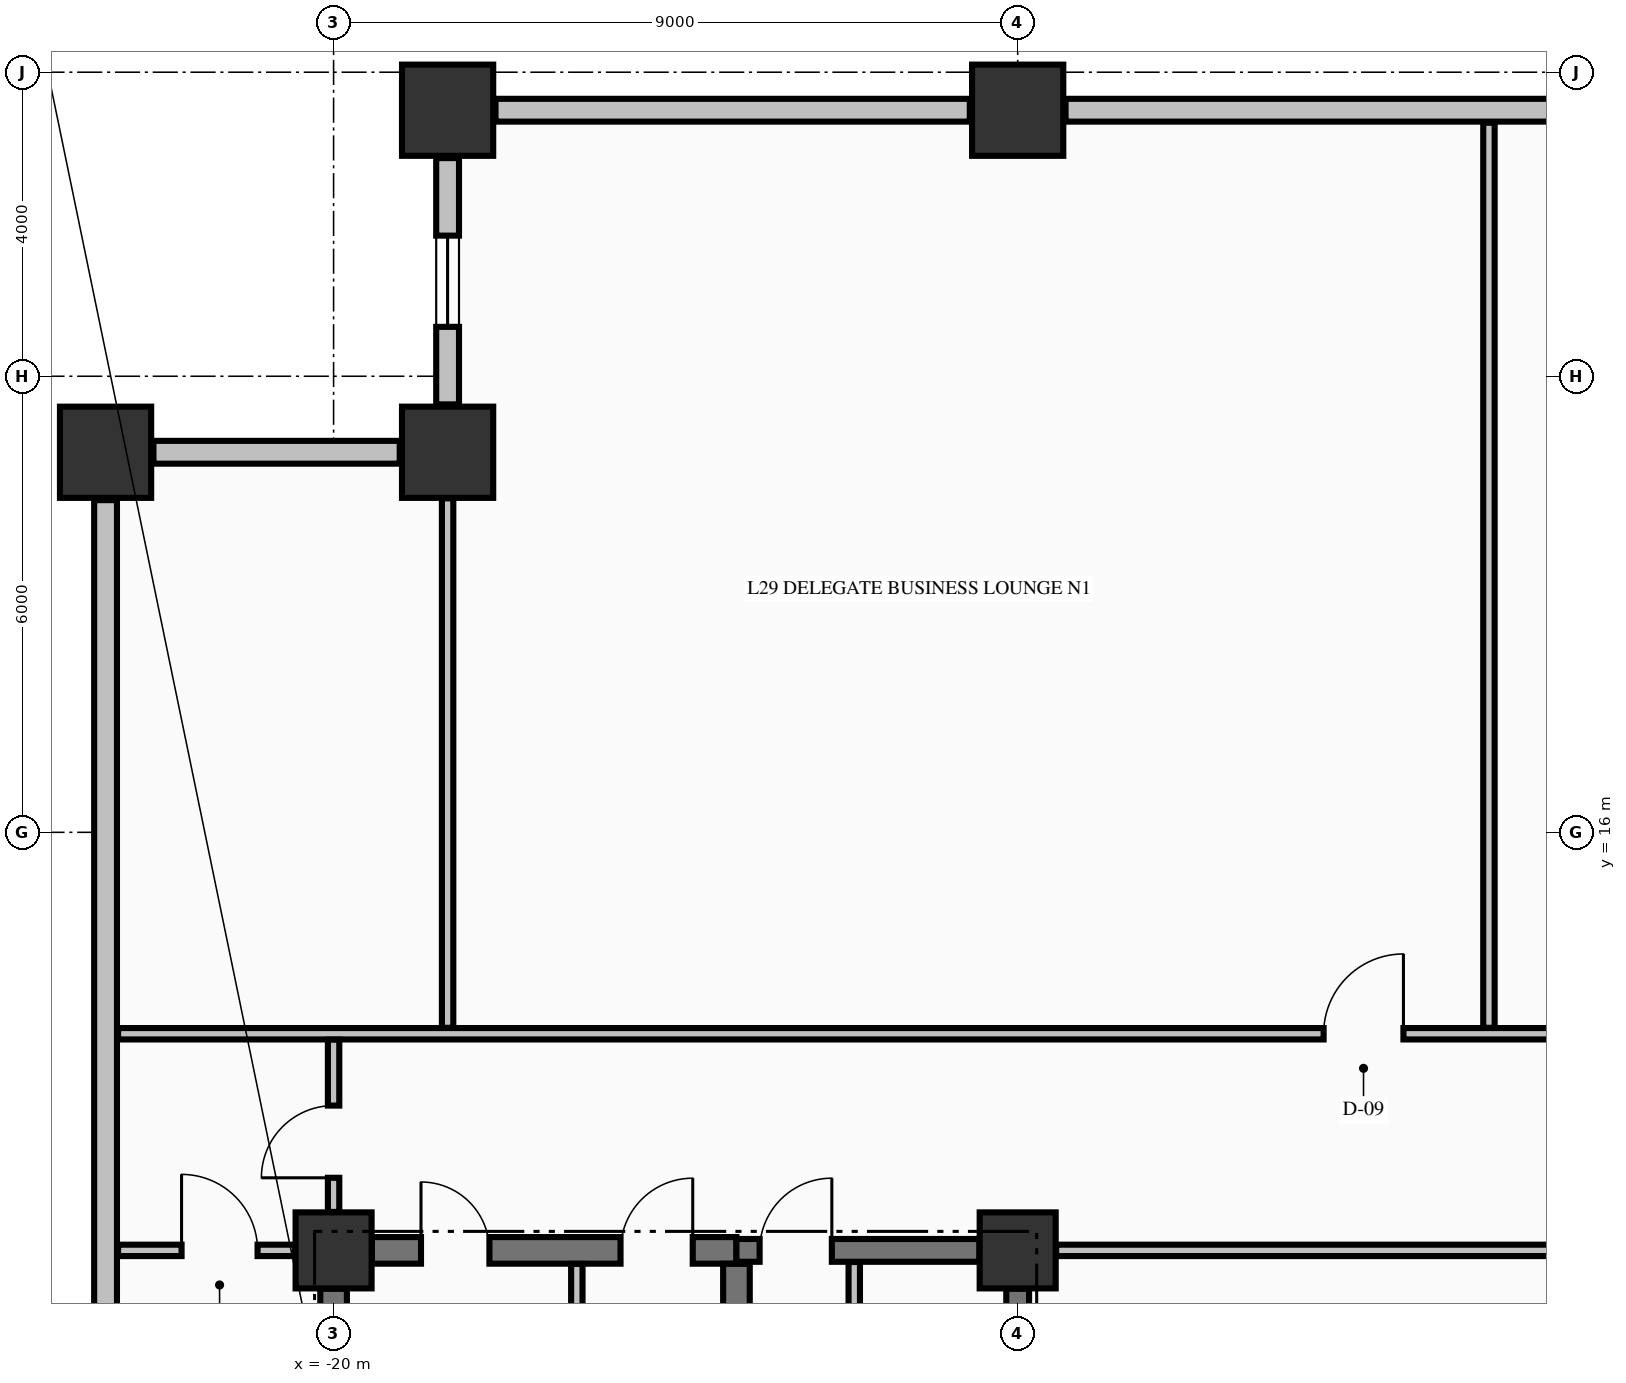
"""IFC4 building model, lengths in metres.
Left out: names, types, materials, properties, quantities, classifications, styles, units other than length and angle.
Written with IfcOpenShell. Run it as: python <this file> out.ifc"""

import sys

from ifc_helpers import new_model, si_unit, direction, frame, frame_2d, origin, origin_2d, place, context, subcontext, project, spatial, rectangle, extrude, element, fill, save


model = new_model("IFC4")
c1 = context("Model", 3, precision=1e-05, world=origin(), true_north=direction((0.0, 1.0)))
c2 = subcontext(c1, "Body", "Model", "MODEL_VIEW")
j1 = project(units=[si_unit("LENGTHUNIT", "METRE"), si_unit("PLANEANGLEUNIT", "RADIAN")], contexts=[c1])
p1 = place(None, origin())
s1 = spatial("IfcSite", under=j1, at=p1, CompositionType="ELEMENT")
p2 = place(p1, origin())
s2 = spatial("IfcBuilding", under=s1, at=p2, CompositionType="ELEMENT")
p3 = place(p2, frame((0.0, 0.0, 116.35)))
s3 = spatial("IfcBuildingStorey", under=s2, at=p3, CompositionType="ELEMENT", Elevation=116.35)
for number, where, z_axis, x_axis in (
    (1, (-18.5, 25.5, -0.425), (0.0, 0.0, 1.0), (1.0, 0.0, 0.0)),
    (2, (-11.0, 25.5, -0.425), (0.0, 0.0, 1.0), (1.0, 0.0, 0.0)),
    (3, (-23.0, 21.0, -0.425), (0.0, 0.0, 1.0), (1.0, 0.0, 0.0)),
    (4, (-18.5, 21.0, -0.425), (0.0, 0.0, 1.0), (1.0, 0.0, 0.0)),
):
    element("IfcColumn", number, at=place(p3, frame(where, z_axis=z_axis, x_axis=x_axis)), inside=s3, PredefinedType="COLUMN", context=c2, shape_type="SweptSolid", body=[
        extrude(rectangle(XDim=1.2, YDim=1.2, at=origin_2d()), origin(), (0.0, 0.0, 1.0), 5.0),
    ])
for number, where, z_axis, x_axis in (
    (5, (-20.0, 10.5, -0.425), (0.0, 0.0, 1.0), (1.0, 0.0, 0.0)),
    (6, (-11.0, 10.5, -0.425), (0.0, 0.0, 1.0), (1.0, 0.0, 0.0)),
):
    element("IfcColumn", number, at=place(p3, frame(where, z_axis=z_axis, x_axis=x_axis)), inside=s3, PredefinedType="COLUMN", context=c2, shape_type="SweptSolid", body=[
        extrude(rectangle(XDim=1.0, YDim=1.0, at=origin_2d()), origin(), (0.0, 0.0, 1.0), 5.0),
    ])
p4 = place(p3, frame((-18.5, 24.87, 0.0), z_axis=(0.0, 0.0, 1.0), x_axis=(0.0, -1.0, 0.0)))
e7 = element("IfcWall", 7, at=p4, inside=s3, PredefinedType="STANDARD", context=c2, shape_type="SweptSolid", body=[
    extrude(rectangle(XDim=3.24, YDim=0.3, at=frame_2d((1.62, 0.0))), origin(), (0.0, 0.0, 1.0), 2.767),
])
p5 = place(p4, frame((1.02, 0.0, 0.82)))
e8 = element("IfcOpeningElement", 8, at=p5, cuts=e7, PredefinedType="OPENING", context=c2, shape_type="SweptSolid", body=[
    extrude(rectangle(XDim=1.2, YDim=1.65, at=frame_2d((0.6, 0.825))), frame((0.0, 0.16, 0.0), z_axis=(0.0, -1.0, 0.0), x_axis=(1.0, 0.0, 0.0)), (0.0, 0.0, 1.0), 0.32),
])
p6 = place(p3, frame((-19.13, 21.0, 0.0), z_axis=(0.0, 0.0, 1.0), x_axis=(-1.0, 0.0, 0.0)))
e9 = element("IfcWall", 9, at=p6, inside=s3, PredefinedType="STANDARD", context=c2, shape_type="SweptSolid", body=[
    extrude(rectangle(XDim=3.24, YDim=0.3, at=frame_2d((1.62, 0.0))), origin(), (0.0, 0.0, 1.0), 2.167),
])
p7 = place(p3, frame((-11.63, 25.5, 0.0), z_axis=(0.0, 0.0, 1.0), x_axis=(-1.0, 0.0, 0.0)))
e10 = element("IfcWall", 10, at=p7, inside=s3, PredefinedType="STANDARD", context=c2, shape_type="SweptSolid", body=[
    extrude(rectangle(XDim=6.24, YDim=0.3, at=frame_2d((3.12, 0.0))), origin(), (0.0, 0.0, 1.0), 2.167),
])
p8 = place(p3, frame((-0.63, 25.5, 0.0), z_axis=(0.0, 0.0, 1.0), x_axis=(-1.0, 0.0, 0.0)))
e11 = element("IfcWall", 11, at=p8, inside=s3, PredefinedType="STANDARD", context=c2, shape_type="SweptSolid", body=[
    extrude(rectangle(XDim=9.74, YDim=0.3, at=frame_2d((4.87, 0.0))), origin(), (0.0, 0.0, 1.0), 2.167),
])
p9 = place(p3, frame((-23.0, 20.37, 0.0), z_axis=(0.0, 0.0, 1.0), x_axis=(0.0, -1.0, 0.0)))
e12 = element("IfcWall", 12, at=p9, inside=s3, PredefinedType="STANDARD", context=c2, shape_type="SweptSolid", body=[
    extrude(rectangle(XDim=10.74, YDim=0.3, at=frame_2d((5.37, 0.0))), origin(), (0.0, 0.0, 1.0), 2.167),
])
p10 = place(p3, frame((-19.496, 10.5, 0.0), z_axis=(0.0, 0.0, 1.0), x_axis=(1.0, 0.0, 0.0)))
e13 = element("IfcWall", 13, at=p10, inside=s3, PredefinedType="SHEAR", context=c2, shape_type="SweptSolid", body=[
    extrude(rectangle(XDim=4.796, YDim=0.35, at=frame_2d((2.398, 0.0))), origin(), (0.0, 0.0, 1.0), 4.575),
])
p11 = place(p10, frame((0.646, 0.0, 0.0)))
e14 = element("IfcOpeningElement", 14, at=p11, cuts=e13, PredefinedType="OPENING", context=c2, shape_type="SweptSolid", body=[
    extrude(rectangle(XDim=0.9, YDim=2.15, at=frame_2d((0.45, 1.075))), frame((0.0, 0.185, 0.0), z_axis=(0.0, -1.0, 0.0), x_axis=(1.0, 0.0, 0.0)), (0.0, 0.0, 1.0), 0.37),
])
p12 = place(p10, frame((3.271, 0.0, 0.0)))
e15 = element("IfcOpeningElement", 15, at=p12, cuts=e13, PredefinedType="OPENING", context=c2, shape_type="SweptSolid", body=[
    extrude(rectangle(XDim=0.95, YDim=2.15, at=frame_2d((0.475, 1.075))), frame((0.0, 0.185, 0.0), z_axis=(0.0, -1.0, 0.0), x_axis=(1.0, 0.0, 0.0)), (0.0, 0.0, 1.0), 0.37),
])
p13 = place(p3, frame((-14.7, 10.5, 0.0), z_axis=(0.0, 0.0, 1.0), x_axis=(1.0, 0.0, 0.0)))
e16 = element("IfcWall", 16, at=p13, inside=s3, PredefinedType="SHEAR", context=c2, shape_type="SweptSolid", body=[
    extrude(rectangle(XDim=3.196, YDim=0.3, at=frame_2d((1.598, 0.0))), origin(), (0.0, 0.0, 1.0), 4.575),
])
p14 = place(p13, frame((0.305, 0.0, 0.0)))
e17 = element("IfcOpeningElement", 17, at=p14, cuts=e16, PredefinedType="OPENING", context=c2, shape_type="SweptSolid", body=[
    extrude(rectangle(XDim=0.95, YDim=2.15, at=frame_2d((0.475, 1.075))), frame((0.0, 0.16, 0.0), z_axis=(0.0, -1.0, 0.0), x_axis=(1.0, 0.0, 0.0)), (0.0, 0.0, 1.0), 0.32),
])
p15 = place(p3, frame((-22.835, 10.5, 0.0), z_axis=(0.0, 0.0, 1.0), x_axis=(1.0, 0.0, 0.0)))
e18 = element("IfcWall", 18, at=p15, inside=s3, PredefinedType="PARTITIONING", context=c2, shape_type="SweptSolid", body=[
    extrude(rectangle(XDim=2.329, YDim=0.15, at=frame_2d((1.165, 0.0))), origin(), (0.0, 0.0, 1.0), 4.575),
])
p16 = place(p15, frame((0.835, 0.0, 0.0)))
e19 = element("IfcOpeningElement", 19, at=p16, cuts=e18, PredefinedType="OPENING", context=c2, shape_type="SweptSolid", body=[
    extrude(rectangle(XDim=1.0, YDim=2.15, at=frame_2d((0.5, 1.075))), frame((0.0, 0.085, 0.0), z_axis=(0.0, -1.0, 0.0), x_axis=(1.0, 0.0, 0.0)), (0.0, 0.0, 1.0), 0.17),
])
p17 = place(p3, frame((-10.494, 10.5, 0.0), z_axis=(0.0, 0.0, 1.0), x_axis=(1.0, 0.0, 0.0)))
e20 = element("IfcWall", 20, at=p17, inside=s3, PredefinedType="PARTITIONING", context=c2, shape_type="SweptSolid", body=[
    extrude(rectangle(XDim=20.988, YDim=0.15, at=frame_2d((10.494, 0.0))), origin(), (0.0, 0.0, 1.0), 4.575),
])
p18 = place(p17, frame((15.394, 0.0, 0.0)))
e21 = element("IfcOpeningElement", 21, at=p18, cuts=e20, PredefinedType="OPENING", context=c2, shape_type="SweptSolid", body=[
    extrude(rectangle(XDim=1.1, YDim=2.15, at=frame_2d((0.55, 1.075))), frame((0.0, 0.085, 0.0), z_axis=(0.0, -1.0, 0.0), x_axis=(1.0, 0.0, 0.0)), (0.0, 0.0, 1.0), 0.17),
])
p19 = place(p3, frame((-22.835, 13.35, 0.0), z_axis=(0.0, 0.0, 1.0), x_axis=(1.0, 0.0, 0.0)))
e22 = element("IfcWall", 22, at=p19, inside=s3, PredefinedType="PARTITIONING", context=c2, shape_type="SweptSolid", body=[
    extrude(rectangle(XDim=50.67, YDim=0.15, at=frame_2d((25.335, 0.0))), origin(), (0.0, 0.0, 1.0), 4.575),
])
p20 = place(p19, frame((15.86, 0.0, 0.0)))
e23 = element("IfcOpeningElement", 23, at=p20, cuts=e22, PredefinedType="OPENING", context=c2, shape_type="SweptSolid", body=[
    extrude(rectangle(XDim=1.05, YDim=2.15, at=frame_2d((0.525, 1.075))), frame((0.0, 0.085, 0.0), z_axis=(0.0, -1.0, 0.0), x_axis=(1.0, 0.0, 0.0)), (0.0, 0.0, 1.0), 0.17),
])
p21 = place(p19, frame((29.81, 0.0, 0.0)))
e24 = element("IfcOpeningElement", 24, at=p21, cuts=e22, PredefinedType="OPENING", context=c2, shape_type="SweptSolid", body=[
    extrude(rectangle(XDim=1.05, YDim=2.15, at=frame_2d((0.525, 1.075))), frame((0.0, 0.085, 0.0), z_axis=(0.0, -1.0, 0.0), x_axis=(1.0, 0.0, 0.0)), (0.0, 0.0, 1.0), 0.17),
])
p22 = place(p3, frame((-20.0, 0.504, 0.0), z_axis=(0.0, 0.0, 1.0), x_axis=(0.0, 1.0, 0.0)))
e25 = element("IfcWall", 25, at=p22, inside=s3, PredefinedType="SHEAR", context=c2, shape_type="SweptSolid", body=[
    extrude(rectangle(XDim=9.492, YDim=0.35, at=frame_2d((4.746, 0.0))), origin(), (0.0, 0.0, 1.0), 4.575),
])
p23 = place(p3, frame((-14.7, 5.852, 0.0), z_axis=(0.0, 0.0, 1.0), x_axis=(0.0, 1.0, 0.0)))
e26 = element("IfcWall", 26, at=p23, inside=s3, PredefinedType="SHEAR", context=c2, shape_type="SweptSolid", body=[
    extrude(rectangle(XDim=4.471, YDim=0.35, at=frame_2d((2.235, 0.0))), origin(), (0.0, 0.0, 1.0), 4.575),
])
p24 = place(p3, frame((-11.0, 5.852, 0.0), z_axis=(0.0, 0.0, 1.0), x_axis=(0.0, 1.0, 0.0)))
e27 = element("IfcWall", 27, at=p24, inside=s3, PredefinedType="SHEAR", context=c2, shape_type="SweptSolid", body=[
    extrude(rectangle(XDim=4.144, YDim=0.3, at=frame_2d((2.072, 0.0))), origin(), (0.0, 0.0, 1.0), 4.575),
])
p25 = place(p3, frame((-20.0, 11.006, 0.0), z_axis=(0.0, 0.0, 1.0), x_axis=(0.0, 1.0, 0.0)))
e28 = element("IfcWall", 28, at=p25, inside=s3, PredefinedType="PARTITIONING", context=c2, shape_type="SweptSolid", body=[
    extrude(rectangle(XDim=2.266, YDim=0.15, at=frame_2d((1.133, 0.0))), origin(), (0.0, 0.0, 1.0), 4.065),
])
p26 = place(p25, frame((0.449, 0.0, 0.0)))
e29 = element("IfcOpeningElement", 29, at=p26, cuts=e28, PredefinedType="OPENING", context=c2, shape_type="SweptSolid", body=[
    extrude(rectangle(XDim=0.95, YDim=2.02, at=frame_2d((0.475, 1.01))), frame((0.0, 0.085, 0.0), z_axis=(0.0, -1.0, 0.0), x_axis=(1.0, 0.0, 0.0)), (0.0, 0.0, 1.0), 0.17),
])
p27 = place(p3, frame((-18.5, 13.428, 0.0), z_axis=(0.0, 0.0, 1.0), x_axis=(0.0, 1.0, 0.0)))
e30 = element("IfcWall", 30, at=p27, inside=s3, PredefinedType="PARTITIONING", context=c2, shape_type="SweptSolid", body=[
    extrude(rectangle(XDim=6.966, YDim=0.15, at=frame_2d((3.483, 0.0))), origin(), (0.0, 0.0, 1.0), 4.575),
])
p28 = place(p3, frame((-16.8, 4.878, 0.0), z_axis=(0.0, 0.0, 1.0), x_axis=(0.0, 1.0, 0.0)))
e31 = element("IfcWall", 31, at=p28, inside=s3, PredefinedType="PARTITIONING", context=c2, shape_type="SweptSolid", body=[
    extrude(rectangle(XDim=5.444, YDim=0.15, at=frame_2d((2.722, 0.0))), origin(), (0.0, 0.0, 1.0), 4.575),
])
p29 = place(p3, frame((-13.15, 7.228, 0.0), z_axis=(0.0, 0.0, 1.0), x_axis=(0.0, 1.0, 0.0)))
e32 = element("IfcWall", 32, at=p29, inside=s3, PredefinedType="PARTITIONING", context=c2, shape_type="SweptSolid", body=[
    extrude(rectangle(XDim=3.119, YDim=0.15, at=frame_2d((1.56, 0.0))), origin(), (0.0, 0.0, 1.0), 4.575),
])
p30 = place(p29, frame((1.097, 0.0, 0.0)))
e33 = element("IfcOpeningElement", 33, at=p30, cuts=e32, PredefinedType="OPENING", context=c2, shape_type="SweptSolid", body=[
    extrude(rectangle(XDim=0.95, YDim=2.15, at=frame_2d((0.475, 1.075))), frame((0.0, 0.085, 0.0), z_axis=(0.0, -1.0, 0.0), x_axis=(1.0, 0.0, 0.0)), (0.0, 0.0, 1.0), 0.17),
])
p31 = place(p3, frame((-4.8, 13.428, 0.0), z_axis=(0.0, 0.0, 1.0), x_axis=(0.0, 1.0, 0.0)))
e34 = element("IfcWall", 34, at=p31, inside=s3, PredefinedType="PARTITIONING", context=c2, shape_type="SweptSolid", body=[
    extrude(rectangle(XDim=11.907, YDim=0.15, at=frame_2d((5.954, 0.0))), origin(), (0.0, 0.0, 1.0), 4.575),
])
p32 = place(p5, origin())
e35 = element("IfcWindow", 35, at=p32, inside=s3, PartitioningType="SINGLE_PANEL", PredefinedType="WINDOW", context=c2, shape_type="SweptSolid", body=[
    extrude(rectangle(XDim=1.2, YDim=1.65, at=frame_2d((0.6, 0.825))), frame((0.0, 0.03, 0.0), z_axis=(0.0, -1.0, 0.0), x_axis=(1.0, 0.0, 0.0)), (0.0, 0.0, 1.0), 0.06),
])
fill(e8, e35)
p33 = place(p14, origin())
e36 = element("IfcDoor", 36, at=p33, inside=s3, OperationType="SINGLE_SWING_RIGHT", PredefinedType="DOOR", context=c2, shape_type="SweptSolid", body=[
    extrude(rectangle(XDim=0.95, YDim=2.15, at=frame_2d((0.475, 1.075))), frame((0.0, 0.025, 0.0), z_axis=(0.0, -1.0, 0.0), x_axis=(1.0, 0.0, 0.0)), (0.0, 0.0, 1.0), 0.05),
])
fill(e17, e36)
p34 = place(p11, origin())
e37 = element("IfcDoor", 37, at=p34, inside=s3, OperationType="SINGLE_SWING_LEFT", PredefinedType="DOOR", context=c2, shape_type="SweptSolid", body=[
    extrude(rectangle(XDim=0.9, YDim=2.15, at=frame_2d((0.45, 1.075))), frame((0.0, 0.025, 0.0), z_axis=(0.0, -1.0, 0.0), x_axis=(1.0, 0.0, 0.0)), (0.0, 0.0, 1.0), 0.05),
])
fill(e14, e37)
p35 = place(p12, origin())
e38 = element("IfcDoor", 38, at=p35, inside=s3, OperationType="SINGLE_SWING_RIGHT", PredefinedType="DOOR", context=c2, shape_type="SweptSolid", body=[
    extrude(rectangle(XDim=0.95, YDim=2.15, at=frame_2d((0.475, 1.075))), frame((0.0, 0.025, 0.0), z_axis=(0.0, -1.0, 0.0), x_axis=(1.0, 0.0, 0.0)), (0.0, 0.0, 1.0), 0.05),
])
fill(e15, e38)
p36 = place(p20, origin())
e39 = element("IfcDoor", 39, at=p36, inside=s3, OperationType="SINGLE_SWING_RIGHT", PredefinedType="DOOR", context=c2, shape_type="SweptSolid", body=[
    extrude(rectangle(XDim=1.05, YDim=2.15, at=frame_2d((0.525, 1.075))), frame((0.0, 0.025, 0.0), z_axis=(0.0, -1.0, 0.0), x_axis=(1.0, 0.0, 0.0)), (0.0, 0.0, 1.0), 0.05),
])
fill(e23, e39)
p37 = place(p26, origin())
e40 = element("IfcDoor", 40, at=p37, inside=s3, OperationType="SINGLE_SWING_LEFT", PredefinedType="DOOR", context=c2, shape_type="SweptSolid", body=[
    extrude(rectangle(XDim=0.95, YDim=2.02, at=frame_2d((0.475, 1.01))), frame((0.0, 0.025, 0.0), z_axis=(0.0, -1.0, 0.0), x_axis=(1.0, 0.0, 0.0)), (0.0, 0.0, 1.0), 0.05),
])
fill(e29, e40)
p38 = place(p16, origin())
e41 = element("IfcDoor", 41, at=p38, inside=s3, OperationType="SINGLE_SWING_LEFT", PredefinedType="DOOR", context=c2, shape_type="SweptSolid", body=[
    extrude(rectangle(XDim=1.0, YDim=2.15, at=frame_2d((0.5, 1.075))), frame((0.0, 0.025, 0.0), z_axis=(0.0, -1.0, 0.0), x_axis=(1.0, 0.0, 0.0)), (0.0, 0.0, 1.0), 0.05),
])
fill(e19, e41)
save(model, sys.argv[1])
